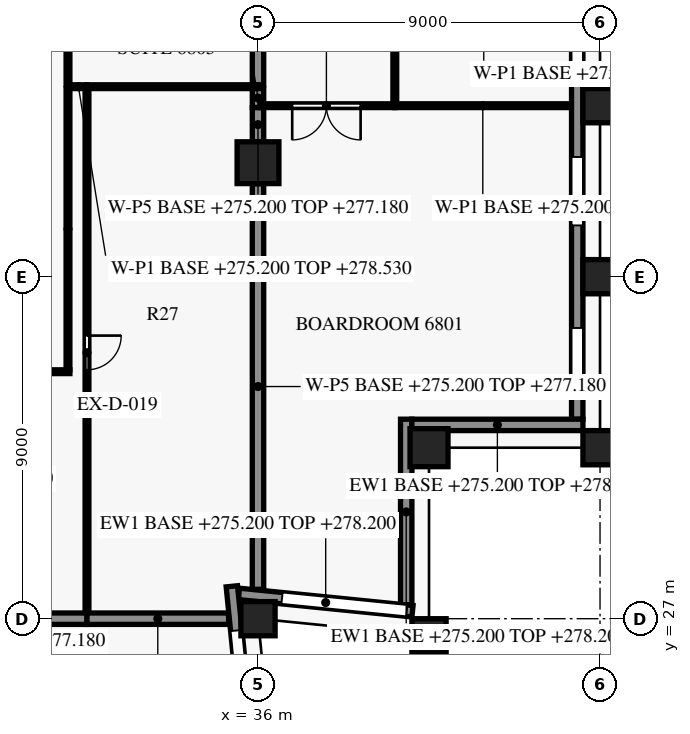
"""IFC4 building model, lengths in metres.
Left out: names, types, materials, properties, quantities, classifications, styles, units other than length and angle.
Written with IfcOpenShell. Run it as: python <this file> out.ifc"""

import sys

from ifc_helpers import new_model, si_unit, direction, frame, frame_2d, origin, origin_2d, place, context, subcontext, project, spatial, rectangle, extrude, element, fill, save


model = new_model("IFC4")
c1 = context("Model", 3, precision=1e-05, world=origin(), true_north=direction((0.0, 1.0)))
c2 = subcontext(c1, "Body", "Model", "MODEL_VIEW")
j1 = project(units=[si_unit("LENGTHUNIT", "METRE"), si_unit("PLANEANGLEUNIT", "RADIAN")], contexts=[c1])
p1 = place(None, origin())
s1 = spatial("IfcSite", under=j1, at=p1, CompositionType="ELEMENT")
p2 = place(p1, origin())
s2 = spatial("IfcBuilding", under=s1, at=p2, CompositionType="ELEMENT")
p3 = place(p2, frame((0.0, 0.0, 275.2)))
s3 = spatial("IfcBuildingStorey", under=s2, at=p3, CompositionType="ELEMENT", Elevation=275.2)
for number, where, z_axis, x_axis in (
    (1, (36.0, 27.0, 0.0), (0.0, 0.0, 1.0), (-0.1, 0.995, 0.0)),
    (2, (40.5, 26.55, 0.0), (0.0, 0.0, 1.0), (0.995, -0.1, 0.0)),
    (3, (45.0, 31.5, 0.0), (0.0, 0.0, 1.0), (0.0, 1.0, 0.0)),
    (4, (45.0, 36.0, 0.0), (0.0, 0.0, 1.0), (0.0, 1.0, 0.0)),
    (5, (45.0, 40.5, 0.0), (0.0, 0.0, 1.0), (0.0, 1.0, 0.0)),
):
    element("IfcColumn", number, at=place(p3, frame(where, z_axis=z_axis, x_axis=x_axis)), inside=s3, PredefinedType="COLUMN", context=c2, shape_type="SweptSolid", body=[
        extrude(rectangle(XDim=0.9, YDim=0.9, at=origin_2d()), origin(), (0.0, 0.0, 1.0), 3.8),
    ])
p4 = place(p3, frame((40.5, 31.5, 0.0), z_axis=(0.0, 0.0, 1.0), x_axis=(1.0, 0.0, 0.0)))
e6 = element("IfcColumn", 6, at=p4, inside=s3, PredefinedType="COLUMN", context=c2, shape_type="SweptSolid", body=[
    extrude(rectangle(XDim=1.0, YDim=1.0, at=origin_2d()), origin(), (0.0, 0.0, 1.0), 3.8),
])
p5 = place(p3, frame((36.0, 39.0, 0.0), z_axis=(0.0, 0.0, 1.0), x_axis=(1.0, 0.0, 0.0)))
e7 = element("IfcColumn", 7, at=p5, inside=s3, PredefinedType="COLUMN", context=c2, shape_type="SweptSolid", body=[
    extrude(rectangle(XDim=1.1, YDim=1.1, at=origin_2d()), origin(), (0.0, 0.0, 1.0), 3.8),
])
p6 = place(p3, frame((35.312, 27.852, 0.0), z_axis=(0.0, 0.0, 1.0), x_axis=(0.099503719021, -0.99503719021, 0.0)))
e8 = element("IfcWall", 8, at=p6, inside=s3, PredefinedType="SOLIDWALL", context=c2, shape_type="SweptSolid", body=[
    extrude(rectangle(XDim=4.62, YDim=0.3, at=frame_2d((2.31, 0.0))), origin(), (0.0, 0.0, 1.0), 3.0),
])
p7 = place(p6, frame((1.17, 0.0, 0.15)))
e9 = element("IfcOpeningElement", 9, at=p7, cuts=e8, PredefinedType="OPENING", context=c2, shape_type="SweptSolid", body=[
    extrude(rectangle(XDim=3.3, YDim=2.4, at=frame_2d((1.65, 1.2))), frame((0.0, 0.16, 0.0), z_axis=(0.0, -1.0, 0.0), x_axis=(1.0, 0.0, 0.0)), (0.0, 0.0, 1.0), 0.32),
])
p8 = place(p3, frame((40.065, 27.197, 0.0), z_axis=(0.0, 0.0, 1.0), x_axis=(-0.995036663613, 0.099508984853, 0.0)))
e10 = element("IfcWall", 10, at=p8, inside=s3, PredefinedType="SOLIDWALL", context=c2, shape_type="SweptSolid", body=[
    extrude(rectangle(XDim=4.59, YDim=0.3, at=frame_2d((2.295, 0.0))), origin(), (0.0, 0.0, 1.0), 3.0),
])
p9 = place(p8, frame((0.15, 0.0, 0.15)))
e11 = element("IfcOpeningElement", 11, at=p9, cuts=e10, PredefinedType="OPENING", context=c2, shape_type="SweptSolid", body=[
    extrude(rectangle(XDim=3.3, YDim=2.4, at=frame_2d((1.65, 1.2))), frame((0.0, 0.16, 0.0), z_axis=(0.0, -1.0, 0.0), x_axis=(1.0, 0.0, 0.0)), (0.0, 0.0, 1.0), 0.32),
])
p10 = place(p3, frame((39.9, 32.25, 0.0), z_axis=(0.0, 0.0, 1.0), x_axis=(0.0, -1.0, 0.0)))
e12 = element("IfcWall", 12, at=p10, inside=s3, PredefinedType="SOLIDWALL", context=c2, shape_type="SweptSolid", body=[
    extrude(rectangle(XDim=4.881, YDim=0.3, at=frame_2d((2.44, 0.0))), origin(), (0.0, 0.0, 1.0), 3.0),
])
p11 = place(p3, frame((44.55, 32.1, 0.0), z_axis=(0.0, 0.0, 1.0), x_axis=(-1.0, 0.0, 0.0)))
e13 = element("IfcWall", 13, at=p11, inside=s3, PredefinedType="SOLIDWALL", context=c2, shape_type="SweptSolid", body=[
    extrude(rectangle(XDim=4.502, YDim=0.3, at=frame_2d((2.251, 0.0))), origin(), (0.0, 0.0, 1.0), 3.0),
])
p12 = place(p3, frame((44.4, 53.85, 0.0), z_axis=(0.0, 0.0, 1.0), x_axis=(0.0, -1.0, 0.0)))
e14 = element("IfcWall", 14, at=p12, inside=s3, PredefinedType="SOLIDWALL", context=c2, shape_type="SweptSolid", body=[
    extrude(rectangle(XDim=21.602, YDim=0.3, at=frame_2d((10.801, 0.0))), origin(), (0.0, 0.0, 1.0), 3.0),
])
p13 = place(p12, frame((1.2, 0.0, 0.75)))
e15 = element("IfcOpeningElement", 15, at=p13, cuts=e14, PredefinedType="OPENING", context=c2, shape_type="SweptSolid", body=[
    extrude(rectangle(XDim=1.8, YDim=1.8, at=frame_2d((0.9, 0.9))), frame((0.0, 0.16, 0.0), z_axis=(0.0, -1.0, 0.0), x_axis=(1.0, 0.0, 0.0)), (0.0, 0.0, 1.0), 0.32),
])
p14 = place(p12, frame((4.95, 0.0, 0.15)))
e16 = element("IfcOpeningElement", 16, at=p14, cuts=e14, PredefinedType="OPENING", context=c2, shape_type="SweptSolid", body=[
    extrude(rectangle(XDim=3.3, YDim=2.4, at=frame_2d((1.65, 1.2))), frame((0.0, 0.16, 0.0), z_axis=(0.0, -1.0, 0.0), x_axis=(1.0, 0.0, 0.0)), (0.0, 0.0, 1.0), 0.32),
])
p15 = place(p12, frame((9.45, 0.0, 0.15)))
e17 = element("IfcOpeningElement", 17, at=p15, cuts=e14, PredefinedType="OPENING", context=c2, shape_type="SweptSolid", body=[
    extrude(rectangle(XDim=3.3, YDim=2.4, at=frame_2d((1.65, 1.2))), frame((0.0, 0.16, 0.0), z_axis=(0.0, -1.0, 0.0), x_axis=(1.0, 0.0, 0.0)), (0.0, 0.0, 1.0), 0.32),
])
p16 = place(p12, frame((14.7, 0.0, 0.75)))
e18 = element("IfcOpeningElement", 18, at=p16, cuts=e14, PredefinedType="OPENING", context=c2, shape_type="SweptSolid", body=[
    extrude(rectangle(XDim=1.8, YDim=1.8, at=frame_2d((0.9, 0.9))), frame((0.0, 0.16, 0.0), z_axis=(0.0, -1.0, 0.0), x_axis=(1.0, 0.0, 0.0)), (0.0, 0.0, 1.0), 0.32),
])
p17 = place(p12, frame((19.2, 0.0, 0.75)))
e19 = element("IfcOpeningElement", 19, at=p17, cuts=e14, PredefinedType="OPENING", context=c2, shape_type="SweptSolid", body=[
    extrude(rectangle(XDim=1.8, YDim=1.8, at=frame_2d((0.9, 0.9))), frame((0.0, 0.16, 0.0), z_axis=(0.0, -1.0, 0.0), x_axis=(1.0, 0.0, 0.0)), (0.0, 0.0, 1.0), 0.32),
])
p18 = place(p3, frame((24.555, 27.0, 0.0), z_axis=(0.0, 0.0, 1.0), x_axis=(1.0, 0.0, 0.0)))
e20 = element("IfcWall", 20, at=p18, inside=s3, PredefinedType="PARTITIONING", context=c2, shape_type="SweptSolid", body=[
    extrude(rectangle(XDim=6.945, YDim=0.3, at=frame_2d((3.473, 0.0))), origin(), (0.0, 0.0, 1.0), 1.98),
])
p19 = place(p3, frame((31.5, 27.0, 0.0), z_axis=(0.0, 0.0, 1.0), x_axis=(1.0, 0.0, 0.0)))
e21 = element("IfcWall", 21, at=p19, inside=s3, PredefinedType="PARTITIONING", context=c2, shape_type="SweptSolid", body=[
    extrude(rectangle(XDim=3.726, YDim=0.3, at=frame_2d((1.863, 0.0))), origin(), (0.0, 0.0, 1.0), 1.98),
])
p20 = place(p3, frame((36.0, 27.774, 0.0), z_axis=(0.0, 0.0, 1.0), x_axis=(0.0, 1.0, 0.0)))
e22 = element("IfcWall", 22, at=p20, inside=s3, PredefinedType="PARTITIONING", context=c2, shape_type="SweptSolid", body=[
    extrude(rectangle(XDim=10.671, YDim=0.3, at=frame_2d((5.336, 0.0))), origin(), (0.0, 0.0, 1.0), 1.98),
])
p21 = place(p3, frame((31.05, 33.5, 0.0), z_axis=(0.0, 0.0, 1.0), x_axis=(-1.0, 0.0, 0.0)))
e23 = element("IfcWall", 23, at=p21, inside=s3, PredefinedType="PARTITIONING", context=c2, shape_type="SweptSolid", body=[
    extrude(rectangle(XDim=8.55, YDim=0.1, at=frame_2d((4.275, 0.0))), origin(), (0.0, 0.0, 1.0), 1.98),
])
p22 = place(p21, frame((3.85, 0.0, 0.0)))
e24 = element("IfcOpeningElement", 24, at=p22, cuts=e23, PredefinedType="OPENING", context=c2, shape_type="SweptSolid", body=[
    extrude(rectangle(XDim=0.9, YDim=2.1, at=frame_2d((0.45, 1.05))), frame((0.0, 0.06, 0.0), z_axis=(0.0, -1.0, 0.0), x_axis=(1.0, 0.0, 0.0)), (0.0, 0.0, 1.0), 0.12),
])
p23 = place(p3, frame((36.0, 39.555, 0.0), z_axis=(0.0, 0.0, 1.0), x_axis=(0.0, 1.0, 0.0)))
e25 = element("IfcWall", 25, at=p23, inside=s3, PredefinedType="PARTITIONING", context=c2, shape_type="SweptSolid", body=[
    extrude(rectangle(XDim=0.895, YDim=0.3, at=frame_2d((0.448, 0.0))), origin(), (0.0, 0.0, 1.0), 1.98),
])
p24 = place(p3, frame((39.6, 40.5, 0.0), z_axis=(0.0, 0.0, 1.0), x_axis=(-1.0, 0.0, 0.0)))
e26 = element("IfcWall", 26, at=p24, inside=s3, PredefinedType="PARTITIONING", context=c2, shape_type="SweptSolid", body=[
    extrude(rectangle(XDim=3.55, YDim=0.1, at=frame_2d((1.775, 0.0))), origin(), (0.0, 0.0, 1.0), 1.98),
])
p25 = place(p24, frame((0.9, 0.0, 0.0)))
e27 = element("IfcOpeningElement", 27, at=p25, cuts=e26, PredefinedType="OPENING", context=c2, shape_type="SweptSolid", body=[
    extrude(rectangle(XDim=1.8, YDim=2.1, at=frame_2d((0.9, 1.05))), frame((0.0, 0.06, 0.0), z_axis=(0.0, -1.0, 0.0), x_axis=(1.0, 0.0, 0.0)), (0.0, 0.0, 1.0), 0.12),
])
p26 = place(p3, frame((44.23, 40.5, 0.0), z_axis=(0.0, 0.0, 1.0), x_axis=(-1.0, 0.0, 0.0)))
e28 = element("IfcWall", 28, at=p26, inside=s3, PredefinedType="PARTITIONING", context=c2, shape_type="SweptSolid", body=[
    extrude(rectangle(XDim=4.63, YDim=0.1, at=frame_2d((2.315, 0.0))), origin(), (0.0, 0.0, 1.0), 3.33),
])
p27 = place(p3, frame((36.0, 40.455, 0.0), z_axis=(0.0, 0.0, 1.0), x_axis=(0.0, 1.0, 0.0)))
e29 = element("IfcWall", 29, at=p27, inside=s3, PredefinedType="PARTITIONING", context=c2, shape_type="SweptSolid", body=[
    extrude(rectangle(XDim=0.495, YDim=0.3, at=frame_2d((0.248, 0.0))), origin(), (0.0, 0.0, 1.0), 1.98),
])
p28 = place(p3, frame((31.0, 40.95, 0.0), z_axis=(0.0, 0.0, 1.0), x_axis=(0.0, -1.0, 0.0)))
e30 = element("IfcWall", 30, at=p28, inside=s3, PredefinedType="PARTITIONING", context=c2, shape_type="SweptSolid", body=[
    extrude(rectangle(XDim=7.4, YDim=0.1, at=frame_2d((3.7, 0.0))), origin(), (0.0, 0.0, 1.0), 2.98),
])
p29 = place(p3, frame((31.5, 40.95, 0.0), z_axis=(0.0, 0.0, 1.0), x_axis=(0.0, -1.0, 0.0)))
e31 = element("IfcWall", 31, at=p29, inside=s3, PredefinedType="PARTITIONING", context=c2, shape_type="SweptSolid", body=[
    extrude(rectangle(XDim=13.78, YDim=0.1, at=frame_2d((6.89, 0.0))), origin(), (0.0, 0.0, 1.0), 1.98),
])
p30 = place(p29, frame((6.5, 0.0, 0.0)))
e32 = element("IfcOpeningElement", 32, at=p30, cuts=e31, PredefinedType="OPENING", context=c2, shape_type="SweptSolid", body=[
    extrude(rectangle(XDim=0.9, YDim=2.1, at=frame_2d((0.45, 1.05))), frame((0.0, 0.06, 0.0), z_axis=(0.0, -1.0, 0.0), x_axis=(1.0, 0.0, 0.0)), (0.0, 0.0, 1.0), 0.12),
])
p31 = place(p3, frame((31.05, 41.0, 0.0), z_axis=(0.0, 0.0, 1.0), x_axis=(1.0, 0.0, 0.0)))
e33 = element("IfcWall", 33, at=p31, inside=s3, PredefinedType="PARTITIONING", context=c2, shape_type="SweptSolid", body=[
    extrude(rectangle(XDim=0.45, YDim=0.1, at=frame_2d((0.225, 0.0))), origin(), (0.0, 0.0, 1.0), 3.33),
])
p32 = place(p3, frame((35.95, 41.0, 0.0), z_axis=(0.0, 0.0, 1.0), x_axis=(-1.0, 0.0, 0.0)))
e34 = element("IfcWall", 34, at=p32, inside=s3, PredefinedType="PARTITIONING", context=c2, shape_type="SweptSolid", body=[
    extrude(rectangle(XDim=4.45, YDim=0.1, at=frame_2d((2.225, 0.0))), origin(), (0.0, 0.0, 1.0), 1.98),
])
p33 = place(p3, frame((36.0, 41.05, 0.0), z_axis=(0.0, 0.0, 1.0), x_axis=(0.0, 1.0, 0.0)))
e35 = element("IfcWall", 35, at=p33, inside=s3, PredefinedType="PARTITIONING", context=c2, shape_type="SweptSolid", body=[
    extrude(rectangle(XDim=9.395, YDim=0.3, at=frame_2d((4.698, 0.0))), origin(), (0.0, 0.0, 1.0), 1.98),
])
p34 = place(p3, frame((39.6, 44.95, 0.0), z_axis=(0.0, 0.0, 1.0), x_axis=(0.0, -1.0, 0.0)))
e36 = element("IfcWall", 36, at=p34, inside=s3, PredefinedType="PARTITIONING", context=c2, shape_type="SweptSolid", body=[
    extrude(rectangle(XDim=4.4, YDim=0.1, at=frame_2d((2.2, 0.0))), origin(), (0.0, 0.0, 1.0), 2.98),
])
p35 = place(p34, frame((1.75, 0.0, 0.0)))
e37 = element("IfcOpeningElement", 37, at=p35, cuts=e36, PredefinedType="OPENING", context=c2, shape_type="SweptSolid", body=[
    extrude(rectangle(XDim=0.9, YDim=2.1, at=frame_2d((0.45, 1.05))), frame((0.0, 0.06, 0.0), z_axis=(0.0, -1.0, 0.0), x_axis=(1.0, 0.0, 0.0)), (0.0, 0.0, 1.0), 0.12),
])
p36 = place(p3, frame((31.0, 54.95, 0.0), z_axis=(0.0, 0.0, 1.0), x_axis=(0.0, -1.0, 0.0)))
e38 = element("IfcWall", 38, at=p36, inside=s3, PredefinedType="PARTITIONING", context=c2, shape_type="SweptSolid", body=[
    extrude(rectangle(XDim=13.9, YDim=0.1, at=frame_2d((6.95, 0.0))), origin(), (0.0, 0.0, 1.0), 2.98),
])
p37 = place(p36, frame((6.5, 0.0, 0.0)))
e39 = element("IfcOpeningElement", 39, at=p37, cuts=e38, PredefinedType="OPENING", context=c2, shape_type="SweptSolid", body=[
    extrude(rectangle(XDim=0.9, YDim=2.1, at=frame_2d((0.45, 1.05))), frame((0.0, 0.06, 0.0), z_axis=(0.0, -1.0, 0.0), x_axis=(1.0, 0.0, 0.0)), (0.0, 0.0, 1.0), 0.12),
])
p38 = place(p7, origin())
e40 = element("IfcWindow", 40, at=p38, inside=s3, PartitioningType="SINGLE_PANEL", PredefinedType="WINDOW", context=c2, shape_type="SweptSolid", body=[
    extrude(rectangle(XDim=3.3, YDim=2.4, at=frame_2d((1.65, 1.2))), frame((0.0, 0.03, 0.0), z_axis=(0.0, -1.0, 0.0), x_axis=(1.0, 0.0, 0.0)), (0.0, 0.0, 1.0), 0.06),
])
fill(e9, e40)
p39 = place(p9, origin())
e41 = element("IfcWindow", 41, at=p39, inside=s3, PartitioningType="SINGLE_PANEL", PredefinedType="WINDOW", context=c2, shape_type="SweptSolid", body=[
    extrude(rectangle(XDim=3.3, YDim=2.4, at=frame_2d((1.65, 1.2))), frame((0.0, 0.03, 0.0), z_axis=(0.0, -1.0, 0.0), x_axis=(1.0, 0.0, 0.0)), (0.0, 0.0, 1.0), 0.06),
])
fill(e11, e41)
p40 = place(p15, origin())
e42 = element("IfcWindow", 42, at=p40, inside=s3, PartitioningType="SINGLE_PANEL", PredefinedType="WINDOW", context=c2, shape_type="SweptSolid", body=[
    extrude(rectangle(XDim=3.3, YDim=2.4, at=frame_2d((1.65, 1.2))), frame((0.0, 0.03, 0.0), z_axis=(0.0, -1.0, 0.0), x_axis=(1.0, 0.0, 0.0)), (0.0, 0.0, 1.0), 0.06),
])
fill(e17, e42)
p41 = place(p16, origin())
e43 = element("IfcWindow", 43, at=p41, inside=s3, PartitioningType="SINGLE_PANEL", PredefinedType="WINDOW", context=c2, shape_type="SweptSolid", body=[
    extrude(rectangle(XDim=1.8, YDim=1.8, at=frame_2d((0.9, 0.9))), frame((0.0, 0.03, 0.0), z_axis=(0.0, -1.0, 0.0), x_axis=(1.0, 0.0, 0.0)), (0.0, 0.0, 1.0), 0.06),
])
fill(e18, e43)
p42 = place(p17, origin())
e44 = element("IfcWindow", 44, at=p42, inside=s3, PartitioningType="SINGLE_PANEL", PredefinedType="WINDOW", context=c2, shape_type="SweptSolid", body=[
    extrude(rectangle(XDim=1.8, YDim=1.8, at=frame_2d((0.9, 0.9))), frame((0.0, 0.03, 0.0), z_axis=(0.0, -1.0, 0.0), x_axis=(1.0, 0.0, 0.0)), (0.0, 0.0, 1.0), 0.06),
])
fill(e19, e44)
p43 = place(p25, origin())
e45 = element("IfcDoor", 45, at=p43, inside=s3, OperationType="DOUBLE_DOOR_SINGLE_SWING", PredefinedType="DOOR", context=c2, shape_type="SweptSolid", body=[
    extrude(rectangle(XDim=1.8, YDim=2.1, at=frame_2d((0.9, 1.05))), frame((0.0, 0.025, 0.0), z_axis=(0.0, -1.0, 0.0), x_axis=(1.0, 0.0, 0.0)), (0.0, 0.0, 1.0), 0.05),
])
fill(e27, e45)
p44 = place(p30, origin())
e46 = element("IfcDoor", 46, at=p44, inside=s3, OperationType="SINGLE_SWING_LEFT", PredefinedType="DOOR", context=c2, shape_type="SweptSolid", body=[
    extrude(rectangle(XDim=0.9, YDim=2.1, at=frame_2d((0.45, 1.05))), frame((0.0, 0.025, 0.0), z_axis=(0.0, -1.0, 0.0), x_axis=(1.0, 0.0, 0.0)), (0.0, 0.0, 1.0), 0.05),
])
fill(e32, e46)
save(model, sys.argv[1])
